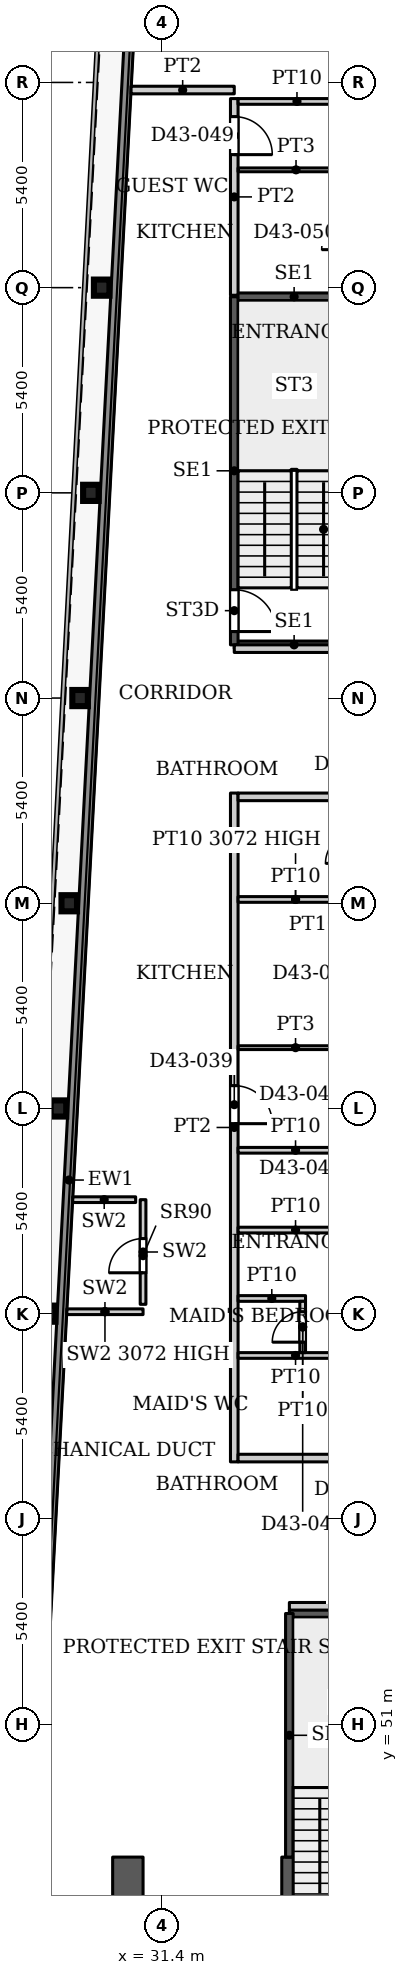
"""IFC4 building model, lengths in metres.
Left out: names, types, materials, properties, quantities, classifications, styles, units other than length and angle.
Written with IfcOpenShell. Run it as: python <this file> out.ifc"""

import sys

from ifc_helpers import new_model, si_unit, direction, frame, frame_2d, origin, origin_2d, place, context, subcontext, project, spatial, rectangle, i_section, extrude, source, transform, mapped, element, fill, save


model = new_model("IFC4")
c1 = context("Model", 3, precision=1e-05, world=origin(), true_north=direction((0.0, 1.0)))
c2 = subcontext(c1, "Body", "Model", "MODEL_VIEW")
j1 = project(units=[si_unit("LENGTHUNIT", "METRE"), si_unit("PLANEANGLEUNIT", "RADIAN")], contexts=[c1])
p1 = place(None, origin())
s1 = spatial("IfcSite", under=j1, at=p1, CompositionType="ELEMENT")
p2 = place(p1, origin())
s2 = spatial("IfcBuilding", under=s1, at=p2, CompositionType="ELEMENT")
p3 = place(p2, frame((0.0, 0.0, 183.8)))
s3 = spatial("IfcBuildingStorey", under=s2, at=p3, CompositionType="ELEMENT", Elevation=183.8)
for number, where, z_axis, x_axis in (
    (1, (28.39, 61.8, 0.0), (0.0, 0.0, 1.0), (1.0, 0.0, 0.0)),
    (2, (28.674, 67.2, 0.0), (0.0, 0.0, 1.0), (1.0, 0.0, 0.0)),
    (3, (28.958, 72.6, 0.0), (0.0, 0.0, 1.0), (1.0, 0.0, 0.0)),
    (4, (29.243, 78.0, 0.0), (0.0, 0.0, 1.0), (1.0, 0.0, 0.0)),
    (5, (29.527, 83.4, 0.0), (0.0, 0.0, 1.0), (1.0, 0.0, 0.0)),
    (6, (29.811, 88.8, 0.0), (0.0, 0.0, 1.0), (1.0, 0.0, 0.0)),
):
    element("IfcColumn", number, at=place(p3, frame(where, z_axis=z_axis, x_axis=x_axis)), inside=s3, PredefinedType="COLUMN", context=c2, shape_type="SweptSolid", body=[
        extrude(i_section(OverallWidth=0.409, OverallDepth=0.425, WebThickness=0.033, FlangeThickness=0.052, FilletRadius=0.013, at=origin_2d()), origin(), (0.0, 0.0, 1.0), 3.9),
    ])
p4 = place(p3, frame((34.75, 29.05, 0.0), z_axis=(0.0, 0.0, 1.0), x_axis=(0.0, 1.0, 0.0)))
e7 = element("IfcWall", 7, at=p4, inside=s3, PredefinedType="SHEAR", context=c2, shape_type="SweptSolid", body=[
    extrude(rectangle(XDim=18.45, YDim=0.4, at=frame_2d((9.225, 0.0))), origin(), (0.0, 0.0, 1.0), 3.9),
])
p5 = place(p4, frame((8.025, 0.0, 0.0)))
e8 = element("IfcOpeningElement", 8, at=p5, cuts=e7, PredefinedType="OPENING", context=c2, shape_type="SweptSolid", body=[
    extrude(rectangle(XDim=1.1, YDim=2.2, at=frame_2d((0.55, 1.1))), frame((0.0, 0.21, 0.0), z_axis=(0.0, -1.0, 0.0), x_axis=(1.0, 0.0, 0.0)), (0.0, 0.0, 1.0), 0.42),
])
p6 = place(p4, frame((10.875, 0.0, 0.0)))
e9 = element("IfcOpeningElement", 9, at=p6, cuts=e7, PredefinedType="OPENING", context=c2, shape_type="SweptSolid", body=[
    extrude(rectangle(XDim=1.1, YDim=2.2, at=frame_2d((0.55, 1.1))), frame((0.0, 0.21, 0.0), z_axis=(0.0, -1.0, 0.0), x_axis=(1.0, 0.0, 0.0)), (0.0, 0.0, 1.0), 0.42),
])
p7 = place(p4, frame((13.725, 0.0, 0.0)))
e10 = element("IfcOpeningElement", 10, at=p7, cuts=e7, PredefinedType="OPENING", context=c2, shape_type="SweptSolid", body=[
    extrude(rectangle(XDim=1.1, YDim=2.2, at=frame_2d((0.55, 1.1))), frame((0.0, 0.21, 0.0), z_axis=(0.0, -1.0, 0.0), x_axis=(1.0, 0.0, 0.0)), (0.0, 0.0, 1.0), 0.42),
])
p8 = place(p4, frame((15.95, 0.0, 0.0)))
e11 = element("IfcOpeningElement", 11, at=p8, cuts=e7, PredefinedType="OPENING", context=c2, shape_type="SweptSolid", body=[
    extrude(rectangle(XDim=1.1, YDim=2.2, at=frame_2d((0.55, 1.1))), frame((0.0, 0.21, 0.0), z_axis=(0.0, -1.0, 0.0), x_axis=(1.0, 0.0, 0.0)), (0.0, 0.0, 1.0), 0.42),
])
p9 = place(p3, frame((30.5, 29.05, 0.0), z_axis=(0.0, 0.0, 1.0), x_axis=(0.0, 1.0, 0.0)))
e12 = element("IfcWall", 12, at=p9, inside=s3, PredefinedType="SHEAR", context=c2, shape_type="SweptSolid", body=[
    extrude(rectangle(XDim=18.45, YDim=0.8, at=frame_2d((9.225, 0.0))), origin(), (0.0, 0.0, 1.0), 3.9),
])
p10 = place(p9, frame((6.21, 0.0, 0.0)))
e13 = element("IfcOpeningElement", 13, at=p10, cuts=e12, PredefinedType="OPENING", context=c2, shape_type="SweptSolid", body=[
    extrude(rectangle(XDim=0.9, YDim=2.2, at=frame_2d((0.45, 1.1))), frame((0.0, 0.41, 0.0), z_axis=(0.0, -1.0, 0.0), x_axis=(1.0, 0.0, 0.0)), (0.0, 0.0, 1.0), 0.82),
])
p11 = place(p9, frame((10.684, 0.0, 0.0)))
e14 = element("IfcOpeningElement", 14, at=p11, cuts=e12, PredefinedType="OPENING", context=c2, shape_type="SweptSolid", body=[
    extrude(rectangle(XDim=0.9, YDim=2.2, at=frame_2d((0.45, 1.1))), frame((0.0, 0.41, 0.0), z_axis=(0.0, -1.0, 0.0), x_axis=(1.0, 0.0, 0.0)), (0.0, 0.0, 1.0), 0.82),
])
p12 = place(p3, frame((27.195, 31.969, 0.0), z_axis=(0.0, 0.0, 1.0), x_axis=(0.052554995867, 0.998618031286, 0.0)))
e15 = element("IfcWall", 15, at=p12, inside=s3, PredefinedType="SOLIDWALL", context=c2, shape_type="SweptSolid", body=[
    extrude(rectangle(XDim=66.787, YDim=0.25, at=frame_2d((33.394, 0.0))), origin(), (0.0, 0.0, 1.0), 3.75),
])
p13 = place(p3, frame((34.75, 53.91, 0.0), z_axis=(0.0, 0.0, 1.0), x_axis=(1.0, 0.0, 0.0)))
e16 = element("IfcWall", 16, at=p13, inside=s3, PredefinedType="SHEAR", context=c2, shape_type="SweptSolid", body=[
    extrude(rectangle(XDim=3.15, YDim=0.2, at=frame_2d((1.575, 0.0))), origin(), (0.0, 0.0, 1.0), 3.9),
])
p14 = place(p3, frame((34.75, 47.5, 0.0), z_axis=(0.0, 0.0, 1.0), x_axis=(0.0, 1.0, 0.0)))
e17 = element("IfcWall", 17, at=p14, inside=s3, PredefinedType="SHEAR", context=c2, shape_type="SweptSolid", body=[
    extrude(rectangle(XDim=6.41, YDim=0.2, at=frame_2d((3.205, 0.0))), origin(), (0.0, 0.0, 1.0), 3.9),
])
for number, where, z_axis, x_axis in (
    (18, (33.3, 79.4, 0.0), (0.0, 0.0, 1.0), (1.0, 0.0, 0.0)),
    (19, (33.3, 88.56, 0.0), (0.0, 0.0, 1.0), (1.0, 0.0, 0.0)),
):
    element("IfcWall", number, at=place(p3, frame(where, z_axis=z_axis, x_axis=x_axis)), inside=s3, PredefinedType="SHEAR", context=c2, shape_type="SweptSolid", body=[
        extrude(rectangle(XDim=3.15, YDim=0.2, at=frame_2d((1.575, 0.0))), origin(), (0.0, 0.0, 1.0), 3.9),
    ])
p15 = place(p3, frame((33.3, 79.4, 0.0), z_axis=(0.0, 0.0, 1.0), x_axis=(0.0, 1.0, 0.0)))
e20 = element("IfcWall", 20, at=p15, inside=s3, PredefinedType="SHEAR", context=c2, shape_type="SweptSolid", body=[
    extrude(rectangle(XDim=9.16, YDim=0.2, at=frame_2d((4.58, 0.0))), origin(), (0.0, 0.0, 1.0), 3.9),
])
p16 = place(p15, frame((0.35, 0.0, 0.0)))
e21 = element("IfcOpeningElement", 21, at=p16, cuts=e20, PredefinedType="OPENING", context=c2, shape_type="SweptSolid", body=[
    extrude(rectangle(XDim=1.1, YDim=2.2, at=frame_2d((0.55, 1.1))), frame((0.0, 0.11, 0.0), z_axis=(0.0, -1.0, 0.0), x_axis=(1.0, 0.0, 0.0)), (0.0, 0.0, 1.0), 0.22),
])
p17 = place(p3, frame((28.895, 61.851, 0.0), z_axis=(0.0, 0.0, 1.0), x_axis=(1.0, 0.0, 0.0)))
e22 = element("IfcWall", 22, at=p17, inside=s3, PredefinedType="PARTITIONING", context=c2, shape_type="SweptSolid", body=[
    extrude(rectangle(XDim=2.005, YDim=0.15, at=frame_2d((1.002, 0.0))), origin(), (0.0, 0.0, 1.0), 3.072),
])
p18 = place(p3, frame((30.9, 62.046, 0.0), z_axis=(0.0, 0.0, 1.0), x_axis=(0.0, 1.0, 0.0)))
e23 = element("IfcWall", 23, at=p18, inside=s3, PredefinedType="PARTITIONING", context=c2, shape_type="SweptSolid", body=[
    extrude(rectangle(XDim=2.754, YDim=0.15, at=frame_2d((1.377, 0.0))), origin(), (0.0, 0.0, 1.0), 3.9),
])
p19 = place(p18, frame((0.83, 0.0, 0.0)))
e24 = element("IfcOpeningElement", 24, at=p19, cuts=e23, PredefinedType="OPENING", context=c2, shape_type="SweptSolid", body=[
    extrude(rectangle(XDim=0.9, YDim=2.2, at=frame_2d((0.45, 1.1))), frame((0.0, 0.085, 0.0), z_axis=(0.0, -1.0, 0.0), x_axis=(1.0, 0.0, 0.0)), (0.0, 0.0, 1.0), 0.17),
])
p20 = place(p3, frame((29.05, 64.8, 0.0), z_axis=(0.0, 0.0, 1.0), x_axis=(1.0, 0.0, 0.0)))
e25 = element("IfcWall", 25, at=p20, inside=s3, PredefinedType="PARTITIONING", context=c2, shape_type="SweptSolid", body=[
    extrude(rectangle(XDim=1.655, YDim=0.15, at=frame_2d((0.828, 0.0))), origin(), (0.0, 0.0, 1.0), 3.9),
])
p21 = place(p3, frame((30.585, 94.0, 0.0), z_axis=(0.0, 0.0, 1.0), x_axis=(1.0, 0.0, 0.0)))
e26 = element("IfcWall", 26, at=p21, inside=s3, PredefinedType="PARTITIONING", context=c2, shape_type="SweptSolid", body=[
    extrude(rectangle(XDim=2.715, YDim=0.2, at=frame_2d((1.358, 0.0))), origin(), (0.0, 0.0, 1.0), 3.6),
])
p22 = place(p3, frame((33.3, 57.9, 0.0), z_axis=(0.0, 0.0, 1.0), x_axis=(0.0, 1.0, 0.0)))
e27 = element("IfcWall", 27, at=p22, inside=s3, PredefinedType="PARTITIONING", context=c2, shape_type="SweptSolid", body=[
    extrude(rectangle(XDim=17.6, YDim=0.2, at=frame_2d((8.8, 0.0))), origin(), (0.0, 0.0, 1.0), 3.6),
])
p23 = place(p22, frame((8.9, 0.0, 0.0)))
e28 = element("IfcOpeningElement", 28, at=p23, cuts=e27, PredefinedType="OPENING", context=c2, shape_type="SweptSolid", body=[
    extrude(rectangle(XDim=1.0, YDim=2.1, at=frame_2d((0.5, 1.05))), frame((0.0, 0.11, 0.0), z_axis=(0.0, -1.0, 0.0), x_axis=(1.0, 0.0, 0.0)), (0.0, 0.0, 1.0), 0.22),
])
p24 = place(p3, frame((33.3, 79.3, 0.0), z_axis=(0.0, 0.0, 1.0), x_axis=(1.0, 0.0, 0.0)))
e29 = element("IfcWall", 29, at=p24, inside=s3, PredefinedType="PARTITIONING", context=c2, shape_type="SweptSolid", body=[
    extrude(rectangle(XDim=12.6, YDim=0.2, at=frame_2d((6.3, 0.0))), origin(), (0.0, 0.0, 1.0), 3.6),
])
p25 = place(p24, frame((5.795, 0.0, 0.0)))
e30 = element("IfcOpeningElement", 30, at=p25, cuts=e29, PredefinedType="OPENING", context=c2, shape_type="SweptSolid", body=[
    extrude(rectangle(XDim=1.0, YDim=2.1, at=frame_2d((0.5, 1.05))), frame((0.0, 0.11, 0.0), z_axis=(0.0, -1.0, 0.0), x_axis=(1.0, 0.0, 0.0)), (0.0, 0.0, 1.0), 0.22),
])
p26 = place(p3, frame((33.3, 88.6, 0.0), z_axis=(0.0, 0.0, 1.0), x_axis=(0.0, 1.0, 0.0)))
e31 = element("IfcWall", 31, at=p26, inside=s3, PredefinedType="PARTITIONING", context=c2, shape_type="SweptSolid", body=[
    extrude(rectangle(XDim=5.175, YDim=0.2, at=frame_2d((2.587, 0.0))), origin(), (0.0, 0.0, 1.0), 3.6),
])
p27 = place(p26, frame((3.7, 0.0, 0.0)))
e32 = element("IfcOpeningElement", 32, at=p27, cuts=e31, PredefinedType="OPENING", context=c2, shape_type="SweptSolid", body=[
    extrude(rectangle(XDim=1.0, YDim=2.1, at=frame_2d((0.5, 1.05))), frame((0.0, 0.11, 0.0), z_axis=(0.0, -1.0, 0.0), x_axis=(1.0, 0.0, 0.0)), (0.0, 0.0, 1.0), 0.22),
])
p28 = place(p3, frame((33.4, 58.0, 0.0), z_axis=(0.0, 0.0, 1.0), x_axis=(1.0, 0.0, 0.0)))
e33 = element("IfcWall", 33, at=p28, inside=s3, PredefinedType="PARTITIONING", context=c2, shape_type="SweptSolid", body=[
    extrude(rectangle(XDim=12.5, YDim=0.2, at=frame_2d((6.25, 0.0))), origin(), (0.0, 0.0, 1.0), 3.6),
])
p29 = place(p3, frame((33.4, 60.7, 0.0), z_axis=(0.0, 0.0, 1.0), x_axis=(1.0, 0.0, 0.0)))
e34 = element("IfcWall", 34, at=p29, inside=s3, PredefinedType="PARTITIONING", context=c2, shape_type="SweptSolid", body=[
    extrude(rectangle(XDim=3.025, YDim=0.15, at=frame_2d((1.513, 0.0))), origin(), (0.0, 0.0, 1.0), 3.6),
])
p30 = place(p3, frame((33.4, 62.2, 0.0), z_axis=(0.0, 0.0, 1.0), x_axis=(1.0, 0.0, 0.0)))
e35 = element("IfcWall", 35, at=p30, inside=s3, PredefinedType="PARTITIONING", context=c2, shape_type="SweptSolid", body=[
    extrude(rectangle(XDim=1.775, YDim=0.15, at=frame_2d((0.888, 0.0))), origin(), (0.0, 0.0, 1.0), 3.6),
])
for number, where, z_axis, x_axis in (
    (36, (33.4, 64.0, 0.0), (0.0, 0.0, 1.0), (1.0, 0.0, 0.0)),
    (37, (33.4, 66.1, 0.0), (0.0, 0.0, 1.0), (1.0, 0.0, 0.0)),
):
    element("IfcWall", number, at=place(p3, frame(where, z_axis=z_axis, x_axis=x_axis)), inside=s3, PredefinedType="PARTITIONING", context=c2, shape_type="SweptSolid", body=[
        extrude(rectangle(XDim=3.025, YDim=0.15, at=frame_2d((1.513, 0.0))), origin(), (0.0, 0.0, 1.0), 3.6),
    ])
p31 = place(p3, frame((33.4, 68.8, 0.0), z_axis=(0.0, 0.0, 1.0), x_axis=(1.0, 0.0, 0.0)))
e38 = element("IfcWall", 38, at=p31, inside=s3, PredefinedType="PARTITIONING", context=c2, shape_type="SweptSolid", body=[
    extrude(rectangle(XDim=3.025, YDim=0.1, at=frame_2d((1.513, 0.0))), origin(), (0.0, 0.0, 1.0), 3.6),
])
p32 = place(p3, frame((33.4, 72.7, 0.0), z_axis=(0.0, 0.0, 1.0), x_axis=(1.0, 0.0, 0.0)))
e39 = element("IfcWall", 39, at=p32, inside=s3, PredefinedType="PARTITIONING", context=c2, shape_type="SweptSolid", body=[
    extrude(rectangle(XDim=3.025, YDim=0.15, at=frame_2d((1.513, 0.0))), origin(), (0.0, 0.0, 1.0), 3.072),
])
p33 = place(p3, frame((33.4, 75.4, 0.0), z_axis=(0.0, 0.0, 1.0), x_axis=(1.0, 0.0, 0.0)))
e40 = element("IfcWall", 40, at=p33, inside=s3, PredefinedType="PARTITIONING", context=c2, shape_type="SweptSolid", body=[
    extrude(rectangle(XDim=12.5, YDim=0.2, at=frame_2d((6.25, 0.0))), origin(), (0.0, 0.0, 1.0), 3.6),
])
p34 = place(p3, frame((33.4, 91.9, 0.0), z_axis=(0.0, 0.0, 1.0), x_axis=(1.0, 0.0, 0.0)))
e41 = element("IfcWall", 41, at=p34, inside=s3, PredefinedType="PARTITIONING", context=c2, shape_type="SweptSolid", body=[
    extrude(rectangle(XDim=3.05, YDim=0.1, at=frame_2d((1.525, 0.0))), origin(), (0.0, 0.0, 1.0), 3.6),
])
p35 = place(p3, frame((33.4, 93.7, 0.0), z_axis=(0.0, 0.0, 1.0), x_axis=(1.0, 0.0, 0.0)))
e42 = element("IfcWall", 42, at=p35, inside=s3, PredefinedType="PARTITIONING", context=c2, shape_type="SweptSolid", body=[
    extrude(rectangle(XDim=3.1, YDim=0.15, at=frame_2d((1.55, 0.0))), origin(), (0.0, 0.0, 1.0), 3.6),
])
p36 = place(p3, frame((34.75, 54.1, 0.0), z_axis=(0.0, 0.0, 1.0), x_axis=(1.0, 0.0, 0.0)))
e43 = element("IfcWall", 43, at=p36, inside=s3, PredefinedType="PARTITIONING", context=c2, shape_type="SweptSolid", body=[
    extrude(rectangle(XDim=11.15, YDim=0.2, at=frame_2d((5.575, 0.0))), origin(), (0.0, 0.0, 1.0), 3.6),
])
p37 = place(p36, frame((5.075, 0.0, 0.0)))
e44 = element("IfcOpeningElement", 44, at=p37, cuts=e43, PredefinedType="OPENING", context=c2, shape_type="SweptSolid", body=[
    extrude(rectangle(XDim=1.0, YDim=2.1, at=frame_2d((0.5, 1.05))), frame((0.0, 0.11, 0.0), z_axis=(0.0, -1.0, 0.0), x_axis=(1.0, 0.0, 0.0)), (0.0, 0.0, 1.0), 0.22),
])
p38 = place(p3, frame((35.1, 60.775, 0.0), z_axis=(0.0, 0.0, 1.0), x_axis=(0.0, 1.0, 0.0)))
e45 = element("IfcWall", 45, at=p38, inside=s3, PredefinedType="PARTITIONING", context=c2, shape_type="SweptSolid", body=[
    extrude(rectangle(XDim=1.35, YDim=0.15, at=frame_2d((0.675, 0.0))), origin(), (0.0, 0.0, 1.0), 3.6),
])
p39 = place(p38, frame((0.275, 0.0, 0.0)))
e46 = element("IfcOpeningElement", 46, at=p39, cuts=e45, PredefinedType="OPENING", context=c2, shape_type="SweptSolid", body=[
    extrude(rectangle(XDim=0.8, YDim=2.1, at=frame_2d((0.4, 1.05))), frame((0.0, 0.085, 0.0), z_axis=(0.0, -1.0, 0.0), x_axis=(1.0, 0.0, 0.0)), (0.0, 0.0, 1.0), 0.17),
])
m1 = source(origin(), c2, "Body", "SweptSolid", [
    extrude(rectangle(XDim=0.9, YDim=2.2, at=frame_2d((0.45, 1.1))), frame((0.0, 0.025, 0.0), z_axis=(0.0, -1.0, 0.0), x_axis=(1.0, 0.0, 0.0)), (0.0, 0.0, 1.0), 0.05),
])
p40 = place(p19, origin())
e47 = element("IfcDoor", 47, at=p40, inside=s3, OperationType="SINGLE_SWING_LEFT", PredefinedType="DOOR", context=c2, shape_type="MappedRepresentation", body=[
    mapped(m1, transform((0.0, 0.0, 0.0), x_axis=(1.0, 0.0, 0.0), y_axis=(0.0, 1.0, 0.0), z_axis=(0.0, 0.0, 1.0), scale=1.0)),
])
fill(e24, e47)
m2 = source(origin(), c2, "Body", "SweptSolid", [
    extrude(rectangle(XDim=1.1, YDim=2.2, at=frame_2d((0.55, 1.1))), frame((0.0, 0.025, 0.0), z_axis=(0.0, -1.0, 0.0), x_axis=(1.0, 0.0, 0.0)), (0.0, 0.0, 1.0), 0.05),
])
p41 = place(p16, origin())
e48 = element("IfcDoor", 48, at=p41, inside=s3, OperationType="SINGLE_SWING_RIGHT", PredefinedType="DOOR", context=c2, shape_type="MappedRepresentation", body=[
    mapped(m2, transform((0.0, 0.0, 0.0), x_axis=(1.0, 0.0, 0.0), y_axis=(0.0, 1.0, 0.0), z_axis=(0.0, 0.0, 1.0), scale=1.0)),
])
fill(e21, e48)
m3 = source(origin(), c2, "Body", "SweptSolid", [
    extrude(rectangle(XDim=1.0, YDim=2.1, at=frame_2d((0.5, 1.05))), frame((0.0, 0.025, 0.0), z_axis=(0.0, -1.0, 0.0), x_axis=(1.0, 0.0, 0.0)), (0.0, 0.0, 1.0), 0.05),
])
p42 = place(p23, origin())
e49 = element("IfcDoor", 49, at=p42, inside=s3, OperationType="SINGLE_SWING_RIGHT", PredefinedType="DOOR", context=c2, shape_type="MappedRepresentation", body=[
    mapped(m3, transform((0.0, 0.0, 0.0), x_axis=(1.0, 0.0, 0.0), y_axis=(0.0, 1.0, 0.0), z_axis=(0.0, 0.0, 1.0), scale=1.0)),
])
fill(e28, e49)
m4 = source(origin(), c2, "Body", "SweptSolid", [
    extrude(rectangle(XDim=0.8, YDim=2.1, at=frame_2d((0.4, 1.05))), frame((0.0, 0.025, 0.0), z_axis=(0.0, -1.0, 0.0), x_axis=(1.0, 0.0, 0.0)), (0.0, 0.0, 1.0), 0.05),
])
p43 = place(p39, origin())
e50 = element("IfcDoor", 50, at=p43, inside=s3, OperationType="SINGLE_SWING_LEFT", PredefinedType="DOOR", context=c2, shape_type="MappedRepresentation", body=[
    mapped(m4, transform((0.0, 0.0, 0.0), x_axis=(1.0, 0.0, 0.0), y_axis=(0.0, 1.0, 0.0), z_axis=(0.0, 0.0, 1.0), scale=1.0)),
])
fill(e46, e50)
p44 = place(p27, origin())
e51 = element("IfcDoor", 51, at=p44, inside=s3, OperationType="SINGLE_SWING_RIGHT", PredefinedType="DOOR", context=c2, shape_type="MappedRepresentation", body=[
    mapped(m3, transform((0.0, 0.0, 0.0), x_axis=(1.0, 0.0, 0.0), y_axis=(0.0, 1.0, 0.0), z_axis=(0.0, 0.0, 1.0), scale=1.0)),
])
fill(e32, e51)
save(model, sys.argv[1])
